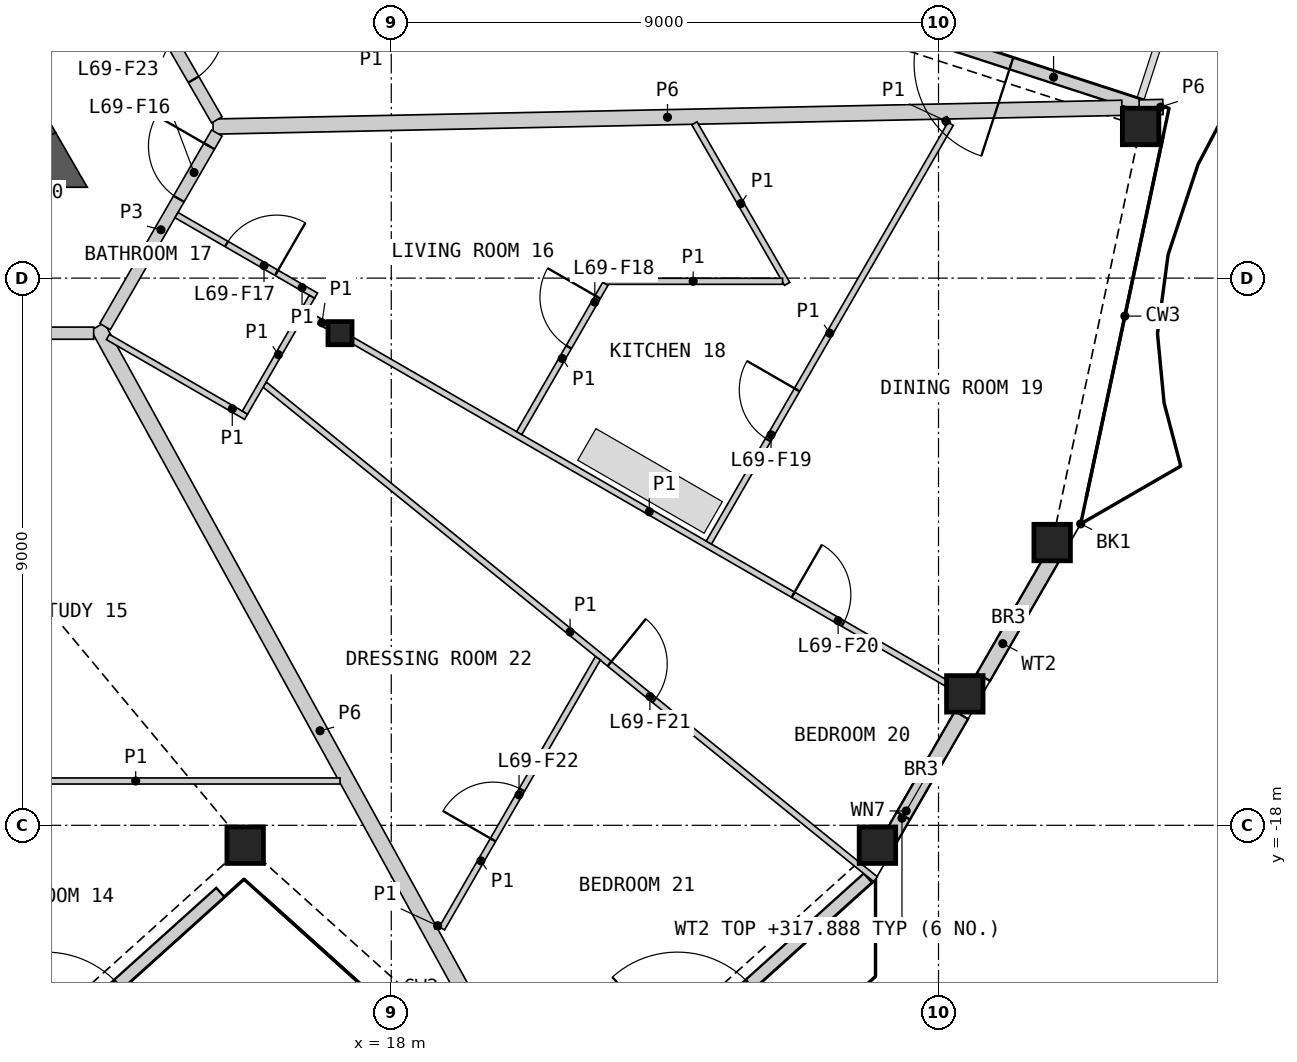
"""IFC4 building model, lengths in metres.
Left out: names, types, materials, properties, quantities, classifications, styles, units other than length and angle.
Written with IfcOpenShell. Run it as: python <this file> out.ifc"""

import sys

from ifc_helpers import new_model, si_unit, direction, frame, frame_2d, origin, origin_2d, place, context, subcontext, project, spatial, polyline, rectangle, hollow_rectangle, i_section, outline, extrude, element, fill, save


model = new_model("IFC4")
c1 = context("Model", 3, precision=1e-05, world=origin(), true_north=direction((0.0, 1.0)))
c2 = subcontext(c1, "Body", "Model", "MODEL_VIEW")
j1 = project(units=[si_unit("LENGTHUNIT", "METRE"), si_unit("PLANEANGLEUNIT", "RADIAN")], contexts=[c1])
p1 = place(None, origin())
s1 = spatial("IfcSite", under=j1, at=p1, CompositionType="ELEMENT")
p2 = place(p1, origin())
s2 = spatial("IfcBuilding", under=s1, at=p2, CompositionType="ELEMENT")
p3 = place(p2, frame((0.0, 0.0, 315.4)))
s3 = spatial("IfcBuildingStorey", under=s2, at=p3, CompositionType="ELEMENT", Elevation=315.4)
for number, where, z_axis, x_axis in (
    (1, (15.597, -18.327, 0.0), (0.0, 0.0, 1.0), (1.0, 0.0, 0.0)),
    (2, (25.995, -18.327, 0.0), (0.0, 0.0, 1.0), (1.0, 0.0, 0.0)),
    (3, (27.432, -15.838, 0.0), (0.0, 0.0, 1.0), (1.0, 0.0, 0.0)),
    (4, (28.869, -13.349, 0.0), (0.0, 0.0, 1.0), (1.0, 0.0, 0.0)),
    (5, (30.324, -6.506, 0.0), (0.0, 0.0, 1.0), (1.0, 0.0, 0.0)),
):
    element("IfcColumn", number, at=place(p3, frame(where, z_axis=z_axis, x_axis=x_axis)), inside=s3, PredefinedType="COLUMN", context=c2, shape_type="SweptSolid", body=[
        extrude(hollow_rectangle(XDim=0.6, YDim=0.6, WallThickness=0.04, at=origin_2d()), origin(), (0.0, 0.0, 1.0), 3.4),
    ])
p4 = place(p3, frame((17.157, -9.906, 0.0), z_axis=(0.0, 0.0, 1.0), x_axis=(1.0, 0.0, 0.0)))
e6 = element("IfcColumn", 6, at=p4, inside=s3, PredefinedType="COLUMN", context=c2, shape_type="SweptSolid", body=[
    extrude(i_section(OverallWidth=0.396, OverallDepth=0.381, WebThickness=0.019, FlangeThickness=0.03, at=origin_2d()), origin(), (0.0, 0.0, 1.0), 3.4),
])
p5 = place(p3, frame((10.641, -23.198, 0.0), z_axis=(0.0, 0.0, 1.0), x_axis=(0.743121537674, 0.66915646918, 0.0)))
e7 = element("IfcWall", 7, at=p5, inside=s3, PredefinedType="SOLIDWALL", context=c2, shape_type="SweptSolid", body=[
    extrude(rectangle(XDim=6.12, YDim=0.2, at=frame_2d((3.06, 0.0))), origin(), (0.0, 0.0, 1.0), 2.488),
])
p6 = place(p5, frame((2.26, 0.0, 0.0)))
e8 = element("IfcOpeningElement", 8, at=p6, cuts=e7, PredefinedType="OPENING", context=c2, shape_type="SweptSolid", body=[
    extrude(rectangle(XDim=1.6, YDim=2.25, at=frame_2d((0.8, 1.125))), frame((0.0, 0.11, 0.0), z_axis=(0.0, -1.0, 0.0), x_axis=(1.0, 0.0, 0.0)), (0.0, 0.0, 1.0), 0.22),
])
p7 = place(p3, frame((21.027, -23.198, 0.0), z_axis=(0.0, 0.0, 1.0), x_axis=(0.74314788005, 0.669127213897, 0.0)))
e9 = element("IfcWall", 9, at=p7, inside=s3, PredefinedType="SOLIDWALL", context=c2, shape_type="SweptSolid", body=[
    extrude(rectangle(XDim=6.475, YDim=0.2, at=frame_2d((3.237, 0.0))), origin(), (0.0, 0.0, 1.0), 2.488),
])
p8 = place(p7, frame((2.26, 0.0, 0.0)))
e10 = element("IfcOpeningElement", 10, at=p8, cuts=e9, PredefinedType="OPENING", context=c2, shape_type="SweptSolid", body=[
    extrude(rectangle(XDim=1.6, YDim=2.25, at=frame_2d((0.8, 1.125))), frame((0.0, 0.11, 0.0), z_axis=(0.0, -1.0, 0.0), x_axis=(1.0, 0.0, 0.0)), (0.0, 0.0, 1.0), 0.22),
])
p9 = place(p3, frame((26.073, -18.448, 0.0), z_axis=(0.0, 0.0, 1.0), x_axis=(0.499992367345, 0.866029810455, 0.0)))
e11 = element("IfcWall", 11, at=p9, inside=s3, PredefinedType="SOLIDWALL", context=c2, shape_type="SweptSolid", body=[
    extrude(rectangle(XDim=2.61, YDim=0.25, at=frame_2d((1.305, 0.0))), origin(), (0.0, 0.0, 1.0), 2.488),
])
p10 = place(p9, frame((0.7, 0.0, 1.6)))
e12 = element("IfcOpeningElement", 12, at=p10, cuts=e11, PredefinedType="OPENING", context=c2, shape_type="SweptSolid", body=[
    extrude(rectangle(XDim=0.9, YDim=0.6, at=frame_2d((0.45, 0.3))), frame((0.0, 0.135, 0.0), z_axis=(0.0, -1.0, 0.0), x_axis=(1.0, 0.0, 0.0)), (0.0, 0.0, 1.0), 0.27),
])
p11 = place(p3, frame((27.739, -15.563, 0.0), z_axis=(0.0, 0.0, 1.0), x_axis=(0.500012659481, 0.866018094706, 0.0)))
e13 = element("IfcWall", 13, at=p11, inside=s3, PredefinedType="SOLIDWALL", context=c2, shape_type="SweptSolid", body=[
    extrude(rectangle(XDim=2.549, YDim=0.25, at=frame_2d((1.274, 0.0))), origin(), (0.0, 0.0, 1.0), 2.488),
])
p12 = place(p3, frame((30.347, -6.168, 0.0), z_axis=(0.0, 0.0, 1.0), x_axis=(-0.951053709789, 0.309025631781, 0.0)))
e14 = element("IfcWall", 14, at=p12, inside=s3, PredefinedType="SOLIDWALL", context=c2, shape_type="SweptSolid", body=[
    extrude(rectangle(XDim=6.12, YDim=0.2, at=frame_2d((3.06, 0.0))), origin(), (0.0, 0.0, 1.0), 2.488),
])
p13 = place(p12, frame((2.26, 0.0, 0.0)))
e15 = element("IfcOpeningElement", 15, at=p13, cuts=e14, PredefinedType="OPENING", context=c2, shape_type="SweptSolid", body=[
    extrude(rectangle(XDim=1.6, YDim=2.25, at=frame_2d((0.8, 1.125))), frame((0.0, 0.11, 0.0), z_axis=(0.0, -1.0, 0.0), x_axis=(1.0, 0.0, 0.0)), (0.0, 0.0, 1.0), 0.22),
])
p14 = place(p3, frame((12.221, -6.756, 0.0), z_axis=(0.0, 0.0, 1.0), x_axis=(-0.50000604952, 0.866021911064, 0.0)))
e16 = element("IfcWall", 16, at=p14, inside=s3, PredefinedType="SHEAR", context=c2, shape_type="SweptSolid", body=[
    extrude(rectangle(XDim=4.869, YDim=0.6, at=frame_2d((2.434, 0.0))), origin(), (0.0, 0.0, 1.0), 3.1),
])
p15 = place(p3, origin())
e17 = element("IfcWall", 17, at=p15, inside=s3, PredefinedType="SHEAR", context=c2, shape_type="SweptSolid", body=[
    extrude(outline(polyline([(11.961, -7.506), (11.961, -6.906), (12.48, -6.606), (13.0, -7.506), (11.961, -7.506)])), origin(), (0.0, 0.0, 1.0), 3.1),
])
p16 = place(p3, frame((13.171, -9.796, 0.0), z_axis=(0.0, 0.0, 1.0), x_axis=(0.481999020381, -0.876171755053, 0.0)))
e18 = element("IfcWall", 18, at=p16, inside=s3, PredefinedType="PARTITIONING", context=c2, shape_type="SweptSolid", body=[
    extrude(rectangle(XDim=15.178, YDim=0.25, at=frame_2d((7.589, 0.0))), origin(), (0.0, 0.0, 1.0), 2.33),
])
p17 = place(p3, frame((15.069, -6.508, 0.0), z_axis=(0.0, 0.0, 1.0), x_axis=(0.999786619639, 0.02065708573, 0.0)))
e19 = element("IfcWall", 19, at=p17, inside=s3, PredefinedType="PARTITIONING", context=c2, shape_type="SweptSolid", body=[
    extrude(rectangle(XDim=14.951, YDim=0.25, at=frame_2d((7.475, 0.0))), origin(), (0.0, 0.0, 1.0), 2.33),
])
p18 = place(p3, frame((8.786, -9.906, 0.0), z_axis=(0.0, 0.0, 1.0), x_axis=(1.0, 0.0, 0.0)))
e20 = element("IfcWall", 20, at=p18, inside=s3, PredefinedType="PARTITIONING", context=c2, shape_type="SweptSolid", body=[
    extrude(rectangle(XDim=4.32, YDim=0.2, at=frame_2d((2.16, 0.0))), origin(), (0.0, 0.0, 1.0), 3.1),
])
p19 = place(p3, frame((12.988, -2.684, 0.0), z_axis=(0.0, 0.0, 1.0), x_axis=(0.500003406062, -0.866023437285, 0.0)))
e21 = element("IfcWall", 21, at=p19, inside=s3, PredefinedType="PARTITIONING", context=c2, shape_type="SweptSolid", body=[
    extrude(rectangle(XDim=4.288, YDim=0.2, at=frame_2d((2.144, 0.0))), origin(), (0.0, 0.0, 1.0), 3.1),
])
p20 = place(p19, frame((2.521, 0.0, 0.0)))
e22 = element("IfcOpeningElement", 22, at=p20, cuts=e21, PredefinedType="OPENING", context=c2, shape_type="SweptSolid", body=[
    extrude(rectangle(XDim=1.0, YDim=2.1, at=frame_2d((0.5, 1.05))), frame((0.0, 0.11, 0.0), z_axis=(0.0, -1.0, 0.0), x_axis=(1.0, 0.0, 0.0)), (0.0, 0.0, 1.0), 0.22),
])
p21 = place(p3, frame((13.293, -9.797, 0.0), z_axis=(0.0, 0.0, 1.0), x_axis=(0.499967746641, 0.866044024469, 0.0)))
e23 = element("IfcWall", 23, at=p21, inside=s3, PredefinedType="PARTITIONING", context=c2, shape_type="SweptSolid", body=[
    extrude(rectangle(XDim=3.676, YDim=0.2, at=frame_2d((1.838, 0.0))), origin(), (0.0, 0.0, 1.0), 3.1),
])
p22 = place(p21, frame((2.426, 0.0, 0.0)))
e24 = element("IfcOpeningElement", 24, at=p22, cuts=e23, PredefinedType="OPENING", context=c2, shape_type="SweptSolid", body=[
    extrude(rectangle(XDim=1.0, YDim=2.1, at=frame_2d((0.5, 1.05))), frame((0.0, 0.11, 0.0), z_axis=(0.0, -1.0, 0.0), x_axis=(1.0, 0.0, 0.0)), (0.0, 0.0, 1.0), 0.22),
])
p23 = place(p3, frame((30.301, -6.193, 0.0), z_axis=(0.0, 0.0, 1.0), x_axis=(0.999786840126, 0.020646411592, 0.0)))
e25 = element("IfcWall", 25, at=p23, inside=s3, PredefinedType="PARTITIONING", context=c2, shape_type="SweptSolid", body=[
    extrude(rectangle(XDim=0.39, YDim=0.25, at=frame_2d((0.195, 0.0))), origin(), (0.0, 0.0, 1.0), 2.33),
])
p24 = place(p3, frame((15.917, -10.751, 0.0), z_axis=(0.0, 0.0, 1.0), x_axis=(0.777149866095, -0.629315569193, 0.0)))
e26 = element("IfcWall", 26, at=p24, inside=s3, PredefinedType="PARTITIONING", context=c2, shape_type="SweptSolid", body=[
    extrude(rectangle(XDim=12.927, YDim=0.1, at=frame_2d((6.464, 0.0))), origin(), (0.0, 0.0, 1.0), 2.33),
])
p25 = place(p24, frame((7.298, 0.0, 0.0)))
e27 = element("IfcOpeningElement", 27, at=p25, cuts=e26, PredefinedType="OPENING", context=c2, shape_type="SweptSolid", body=[
    extrude(rectangle(XDim=0.95, YDim=2.1, at=frame_2d((0.475, 1.05))), frame((0.0, 0.06, 0.0), z_axis=(0.0, -1.0, 0.0), x_axis=(1.0, 0.0, 0.0)), (0.0, 0.0, 1.0), 0.12),
])
p26 = place(p3, frame((17.365, -10.025, 0.0), z_axis=(0.0, 0.0, 1.0), x_axis=(0.866021046153, -0.500007547564, 0.0)))
e28 = element("IfcWall", 28, at=p26, inside=s3, PredefinedType="PARTITIONING", context=c2, shape_type="SweptSolid", body=[
    extrude(rectangle(XDim=11.267, YDim=0.1, at=frame_2d((5.634, 0.0))), origin(), (0.0, 0.0, 1.0), 2.33),
])
p27 = place(p26, frame((8.364, 0.0, 0.0)))
e29 = element("IfcOpeningElement", 29, at=p27, cuts=e28, PredefinedType="OPENING", context=c2, shape_type="SweptSolid", body=[
    extrude(rectangle(XDim=0.95, YDim=2.1, at=frame_2d((0.475, 1.05))), frame((0.0, 0.06, 0.0), z_axis=(0.0, -1.0, 0.0), x_axis=(1.0, 0.0, 0.0)), (0.0, 0.0, 1.0), 0.12),
])
p28 = place(p3, frame((23.223, -13.35, 0.0), z_axis=(0.0, 0.0, 1.0), x_axis=(0.500018284498, 0.866014846967, 0.0)))
e30 = element("IfcWall", 30, at=p28, inside=s3, PredefinedType="PARTITIONING", context=c2, shape_type="SweptSolid", body=[
    extrude(rectangle(XDim=7.953, YDim=0.1, at=frame_2d((3.977, 0.0))), origin(), (0.0, 0.0, 1.0), 2.33),
])
p29 = place(p28, frame((1.951, 0.0, 0.0)))
e31 = element("IfcOpeningElement", 31, at=p29, cuts=e30, PredefinedType="OPENING", context=c2, shape_type="SweptSolid", body=[
    extrude(rectangle(XDim=0.95, YDim=2.1, at=frame_2d((0.475, 1.05))), frame((0.0, 0.06, 0.0), z_axis=(0.0, -1.0, 0.0), x_axis=(1.0, 0.0, 0.0)), (0.0, 0.0, 1.0), 0.12),
])
p30 = place(p3, frame((10.436, -17.271, 0.0), z_axis=(0.0, 0.0, 1.0), x_axis=(1.0, 0.0, 0.0)))
e32 = element("IfcWall", 32, at=p30, inside=s3, PredefinedType="PARTITIONING", context=c2, shape_type="SweptSolid", body=[
    extrude(rectangle(XDim=6.722, YDim=0.1, at=frame_2d((3.361, 0.0))), origin(), (0.0, 0.0, 1.0), 2.33),
])
p31 = place(p30, frame((0.757, 0.0, 0.0)))
e33 = element("IfcOpeningElement", 33, at=p31, cuts=e32, PredefinedType="OPENING", context=c2, shape_type="SweptSolid", body=[
    extrude(rectangle(XDim=0.95, YDim=2.1, at=frame_2d((0.475, 1.05))), frame((0.0, 0.06, 0.0), z_axis=(0.0, -1.0, 0.0), x_axis=(1.0, 0.0, 0.0)), (0.0, 0.0, 1.0), 0.12),
])
p32 = place(p3, frame((18.833, -19.695, 0.0), z_axis=(0.0, 0.0, 1.0), x_axis=(0.500034163155, 0.866005678779, 0.0)))
e34 = element("IfcWall", 34, at=p32, inside=s3, PredefinedType="PARTITIONING", context=c2, shape_type="SweptSolid", body=[
    extrude(rectangle(XDim=5.13, YDim=0.1, at=frame_2d((2.565, 0.0))), origin(), (0.0, 0.0, 1.0), 2.33),
])
p33 = place(p32, frame((1.681, 0.0, 0.0)))
e35 = element("IfcOpeningElement", 35, at=p33, cuts=e34, PredefinedType="OPENING", context=c2, shape_type="SweptSolid", body=[
    extrude(rectangle(XDim=0.95, YDim=2.1, at=frame_2d((0.475, 1.05))), frame((0.0, 0.06, 0.0), z_axis=(0.0, -1.0, 0.0), x_axis=(1.0, 0.0, 0.0)), (0.0, 0.0, 1.0), 0.12),
])
p34 = place(p3, frame((22.986, -6.454, 0.0), z_axis=(0.0, 0.0, 1.0), x_axis=(0.499978833458, -0.866037623948, 0.0)))
e36 = element("IfcWall", 36, at=p34, inside=s3, PredefinedType="PARTITIONING", context=c2, shape_type="SweptSolid", body=[
    extrude(rectangle(XDim=3.05, YDim=0.1, at=frame_2d((1.525, 0.0))), origin(), (0.0, 0.0, 1.0), 2.33),
])
p35 = place(p3, frame((21.495, -9.052, 0.0), z_axis=(0.0, 0.0, 1.0), x_axis=(1.0, 0.0, 0.0)))
e37 = element("IfcWall", 37, at=p35, inside=s3, PredefinedType="PARTITIONING", context=c2, shape_type="SweptSolid", body=[
    extrude(rectangle(XDim=2.94, YDim=0.1, at=frame_2d((1.47, 0.0))), origin(), (0.0, 0.0, 1.0), 2.33),
])
p36 = place(p3, frame((20.104, -11.549, 0.0), z_axis=(0.0, 0.0, 1.0), x_axis=(0.499976073514, 0.866039217307, 0.0)))
e38 = element("IfcWall", 38, at=p36, inside=s3, PredefinedType="PARTITIONING", context=c2, shape_type="SweptSolid", body=[
    extrude(rectangle(XDim=2.833, YDim=0.1, at=frame_2d((1.417, 0.0))), origin(), (0.0, 0.0, 1.0), 2.33),
])
p37 = place(p36, frame((1.633, 0.0, 0.0)))
e39 = element("IfcOpeningElement", 39, at=p37, cuts=e38, PredefinedType="OPENING", context=c2, shape_type="SweptSolid", body=[
    extrude(rectangle(XDim=0.95, YDim=2.1, at=frame_2d((0.475, 1.05))), frame((0.0, 0.06, 0.0), z_axis=(0.0, -1.0, 0.0), x_axis=(1.0, 0.0, 0.0)), (0.0, 0.0, 1.0), 0.12),
])
p38 = place(p3, frame((14.468, -7.964, 0.0), z_axis=(0.0, 0.0, 1.0), x_axis=(0.865989200783, -0.500062700197, 0.0)))
e40 = element("IfcWall", 40, at=p38, inside=s3, PredefinedType="PARTITIONING", context=c2, shape_type="SweptSolid", body=[
    extrude(rectangle(XDim=2.65, YDim=0.1, at=frame_2d((1.325, 0.0))), origin(), (0.0, 0.0, 1.0), 2.33),
])
p39 = place(p38, frame((0.95, 0.0, 0.0)))
e41 = element("IfcOpeningElement", 41, at=p39, cuts=e40, PredefinedType="OPENING", context=c2, shape_type="SweptSolid", body=[
    extrude(rectangle(XDim=0.95, YDim=2.1, at=frame_2d((0.475, 1.05))), frame((0.0, 0.06, 0.0), z_axis=(0.0, -1.0, 0.0), x_axis=(1.0, 0.0, 0.0)), (0.0, 0.0, 1.0), 0.12),
])
p40 = place(p3, frame((13.339, -9.968, 0.0), z_axis=(0.0, 0.0, 1.0), x_axis=(0.866013657776, -0.500020344131, 0.0)))
e42 = element("IfcWall", 42, at=p40, inside=s3, PredefinedType="PARTITIONING", context=c2, shape_type="SweptSolid", body=[
    extrude(rectangle(XDim=2.625, YDim=0.1, at=frame_2d((1.312, 0.0))), origin(), (0.0, 0.0, 1.0), 2.33),
])
p41 = place(p3, frame((15.594, -11.212, 0.0), z_axis=(0.0, 0.0, 1.0), x_axis=(0.499981787252, 0.866035918664, 0.0)))
e43 = element("IfcWall", 43, at=p41, inside=s3, PredefinedType="PARTITIONING", context=c2, shape_type="SweptSolid", body=[
    extrude(rectangle(XDim=2.2, YDim=0.1, at=frame_2d((1.1, 0.0))), origin(), (0.0, 0.0, 1.0), 2.33),
])
p42 = place(p3, frame((16.594, -9.581, 0.0), z_axis=(0.0, 0.0, 1.0), x_axis=(0.866036909293, -0.499980071345, 0.0)))
e44 = element("IfcWall", 44, at=p42, inside=s3, PredefinedType="PARTITIONING", context=c2, shape_type="SweptSolid", body=[
    extrude(rectangle(XDim=0.41, YDim=0.1, at=frame_2d((0.205, 0.0))), origin(), (0.0, 0.0, 1.0), 2.33),
])
p43 = place(p3, frame((27.096, -6.369, 0.0), z_axis=(0.0, 0.0, 1.0), x_axis=(0.500768285049, -0.865581379588, 0.0)))
e45 = element("IfcWall", 45, at=p43, inside=s3, PredefinedType="PARTITIONING", context=c2, shape_type="SweptSolid", body=[
    extrude(rectangle(XDim=0.108, YDim=0.1, at=frame_2d((0.054, 0.0))), origin(), (0.0, 0.0, 1.0), 2.33),
])
p44 = place(p3, frame((18.718, -19.652, 0.0), z_axis=(0.0, 0.0, 1.0), x_axis=(1.0, 0.0, 0.0)))
e46 = element("IfcWall", 46, at=p44, inside=s3, PredefinedType="PARTITIONING", context=c2, shape_type="SweptSolid", body=[
    extrude(rectangle(XDim=0.09, YDim=0.1, at=frame_2d((0.045, 0.0))), origin(), (0.0, 0.0, 1.0), 2.33),
])
p45 = place(p10, origin())
e47 = element("IfcWindow", 47, at=p45, inside=s3, PartitioningType="SINGLE_PANEL", PredefinedType="WINDOW", context=c2, shape_type="SweptSolid", body=[
    extrude(rectangle(XDim=0.9, YDim=0.6, at=frame_2d((0.45, 0.3))), frame((0.0, 0.03, 0.0), z_axis=(0.0, -1.0, 0.0), x_axis=(1.0, 0.0, 0.0)), (0.0, 0.0, 1.0), 0.06),
])
fill(e12, e47)
p46 = place(p13, origin())
e48 = element("IfcDoor", 48, at=p46, inside=s3, OperationType="DOUBLE_DOOR_SINGLE_SWING", PredefinedType="DOOR", context=c2, shape_type="SweptSolid", body=[
    extrude(rectangle(XDim=1.6, YDim=2.25, at=frame_2d((0.8, 1.125))), frame((0.0, 0.025, 0.0), z_axis=(0.0, -1.0, 0.0), x_axis=(1.0, 0.0, 0.0)), (0.0, 0.0, 1.0), 0.05),
])
fill(e15, e48)
p47 = place(p22, origin())
e49 = element("IfcDoor", 49, at=p47, inside=s3, OperationType="SINGLE_SWING_RIGHT", PredefinedType="DOOR", context=c2, shape_type="SweptSolid", body=[
    extrude(rectangle(XDim=1.0, YDim=2.1, at=frame_2d((0.5, 1.05))), frame((0.0, 0.025, 0.0), z_axis=(0.0, -1.0, 0.0), x_axis=(1.0, 0.0, 0.0)), (0.0, 0.0, 1.0), 0.05),
])
fill(e24, e49)
p48 = place(p39, origin())
e50 = element("IfcDoor", 50, at=p48, inside=s3, OperationType="SINGLE_SWING_RIGHT", PredefinedType="DOOR", context=c2, shape_type="SweptSolid", body=[
    extrude(rectangle(XDim=0.95, YDim=2.1, at=frame_2d((0.475, 1.05))), frame((0.0, 0.025, 0.0), z_axis=(0.0, -1.0, 0.0), x_axis=(1.0, 0.0, 0.0)), (0.0, 0.0, 1.0), 0.05),
])
fill(e41, e50)
p49 = place(p37, origin())
e51 = element("IfcDoor", 51, at=p49, inside=s3, OperationType="SINGLE_SWING_RIGHT", PredefinedType="DOOR", context=c2, shape_type="SweptSolid", body=[
    extrude(rectangle(XDim=0.95, YDim=2.1, at=frame_2d((0.475, 1.05))), frame((0.0, 0.025, 0.0), z_axis=(0.0, -1.0, 0.0), x_axis=(1.0, 0.0, 0.0)), (0.0, 0.0, 1.0), 0.05),
])
fill(e39, e51)
p50 = place(p29, origin())
e52 = element("IfcDoor", 52, at=p50, inside=s3, OperationType="SINGLE_SWING_RIGHT", PredefinedType="DOOR", context=c2, shape_type="SweptSolid", body=[
    extrude(rectangle(XDim=0.95, YDim=2.1, at=frame_2d((0.475, 1.05))), frame((0.0, 0.025, 0.0), z_axis=(0.0, -1.0, 0.0), x_axis=(1.0, 0.0, 0.0)), (0.0, 0.0, 1.0), 0.05),
])
fill(e31, e52)
p51 = place(p27, origin())
e53 = element("IfcDoor", 53, at=p51, inside=s3, OperationType="SINGLE_SWING_LEFT", PredefinedType="DOOR", context=c2, shape_type="SweptSolid", body=[
    extrude(rectangle(XDim=0.95, YDim=2.1, at=frame_2d((0.475, 1.05))), frame((0.0, 0.025, 0.0), z_axis=(0.0, -1.0, 0.0), x_axis=(1.0, 0.0, 0.0)), (0.0, 0.0, 1.0), 0.05),
])
fill(e29, e53)
p52 = place(p25, origin())
e54 = element("IfcDoor", 54, at=p52, inside=s3, OperationType="SINGLE_SWING_LEFT", PredefinedType="DOOR", context=c2, shape_type="SweptSolid", body=[
    extrude(rectangle(XDim=0.95, YDim=2.1, at=frame_2d((0.475, 1.05))), frame((0.0, 0.025, 0.0), z_axis=(0.0, -1.0, 0.0), x_axis=(1.0, 0.0, 0.0)), (0.0, 0.0, 1.0), 0.05),
])
fill(e27, e54)
p53 = place(p33, origin())
e55 = element("IfcDoor", 55, at=p53, inside=s3, OperationType="SINGLE_SWING_LEFT", PredefinedType="DOOR", context=c2, shape_type="SweptSolid", body=[
    extrude(rectangle(XDim=0.95, YDim=2.1, at=frame_2d((0.475, 1.05))), frame((0.0, 0.025, 0.0), z_axis=(0.0, -1.0, 0.0), x_axis=(1.0, 0.0, 0.0)), (0.0, 0.0, 1.0), 0.05),
])
fill(e35, e55)
p54 = place(p20, origin())
e56 = element("IfcDoor", 56, at=p54, inside=s3, OperationType="SINGLE_SWING_LEFT", PredefinedType="DOOR", context=c2, shape_type="SweptSolid", body=[
    extrude(rectangle(XDim=1.0, YDim=2.1, at=frame_2d((0.5, 1.05))), frame((0.0, 0.025, 0.0), z_axis=(0.0, -1.0, 0.0), x_axis=(1.0, 0.0, 0.0)), (0.0, 0.0, 1.0), 0.05),
])
fill(e22, e56)
save(model, sys.argv[1])
